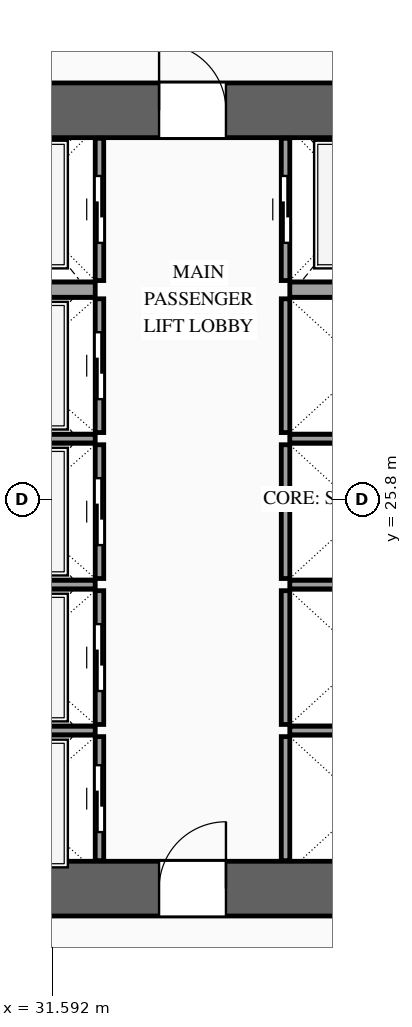
"""IFC4 building model, lengths in metres.
Left out: names, types, materials, properties, quantities, classifications, styles, units other than length and angle.
Written with IfcOpenShell. Run it as: python <this file> out.ifc"""

import sys

from ifc_helpers import new_model, si_unit, direction, frame, frame_2d, origin, place, context, subcontext, project, spatial, rectangle, extrude, source, transform, mapped, element, fill, save


model = new_model("IFC4")
c1 = context("Model", 3, precision=1e-05, world=origin(), true_north=direction((0.0, 1.0)))
c2 = subcontext(c1, "Body", "Model", "MODEL_VIEW")
j1 = project(units=[si_unit("LENGTHUNIT", "METRE"), si_unit("PLANEANGLEUNIT", "RADIAN")], contexts=[c1])
p1 = place(None, origin())
s1 = spatial("IfcSite", under=j1, at=p1, CompositionType="ELEMENT")
p2 = place(p1, origin())
s2 = spatial("IfcBuilding", under=s1, at=p2, CompositionType="ELEMENT")
p3 = place(p2, frame((0.0, 0.0, 15.0)))
s3 = spatial("IfcBuildingStorey", under=s2, at=p3, CompositionType="ELEMENT", Elevation=15.0)
p4 = place(p3, frame((23.35, 19.4, 0.0), z_axis=(0.0, 0.0, 1.0), x_axis=(1.0, 0.0, 0.0)))
e1 = element("IfcWall", 1, at=p4, inside=s3, PredefinedType="SHEAR", context=c2, shape_type="SweptSolid", body=[
    extrude(rectangle(XDim=27.3, YDim=0.9, at=frame_2d((13.65, 0.0))), origin(), (0.0, 0.0, 1.0), 4.8),
])
p5 = place(p4, frame((2.1, 0.0, 0.0)))
e2 = element("IfcOpeningElement", 2, at=p5, cuts=e1, PredefinedType="OPENING", context=c2, shape_type="SweptSolid", body=[
    extrude(rectangle(XDim=1.1, YDim=2.2, at=frame_2d((0.55, 1.1))), frame((0.0, 0.465, 0.0), z_axis=(0.0, -1.0, 0.0), x_axis=(1.0, 0.0, 0.0)), (0.0, 0.0, 1.0), 0.93),
])
p6 = place(p4, frame((10.0, 0.0, 0.0)))
e3 = element("IfcOpeningElement", 3, at=p6, cuts=e1, PredefinedType="OPENING", context=c2, shape_type="SweptSolid", body=[
    extrude(rectangle(XDim=1.1, YDim=2.2, at=frame_2d((0.55, 1.1))), frame((0.0, 0.465, 0.0), z_axis=(0.0, -1.0, 0.0), x_axis=(1.0, 0.0, 0.0)), (0.0, 0.0, 1.0), 0.93),
])
p7 = place(p4, frame((23.2, 0.0, 0.0)))
e4 = element("IfcOpeningElement", 4, at=p7, cuts=e1, PredefinedType="OPENING", context=c2, shape_type="SweptSolid", body=[
    extrude(rectangle(XDim=1.1, YDim=2.2, at=frame_2d((0.55, 1.1))), frame((0.0, 0.465, 0.0), z_axis=(0.0, -1.0, 0.0), x_axis=(1.0, 0.0, 0.0)), (0.0, 0.0, 1.0), 0.93),
])
p8 = place(p4, frame((19.82, 0.0, 0.0)))
e5 = element("IfcOpeningElement", 5, at=p8, cuts=e1, PredefinedType="OPENING", context=c2, shape_type="SweptSolid", body=[
    extrude(rectangle(XDim=0.9, YDim=2.15, at=frame_2d((0.45, 1.075))), frame((0.0, 0.465, 0.0), z_axis=(0.0, -1.0, 0.0), x_axis=(1.0, 0.0, 0.0)), (0.0, 0.0, 1.0), 0.93),
])
p9 = place(p4, frame((18.38, 0.0, 0.0)))
e6 = element("IfcOpeningElement", 6, at=p9, cuts=e1, PredefinedType="OPENING", context=c2, shape_type="SweptSolid", body=[
    extrude(rectangle(XDim=0.9, YDim=2.15, at=frame_2d((0.45, 1.075))), frame((0.0, 0.465, 0.0), z_axis=(0.0, -1.0, 0.0), x_axis=(1.0, 0.0, 0.0)), (0.0, 0.0, 1.0), 0.93),
])
p10 = place(p3, frame((23.35, 32.2, 0.0), z_axis=(0.0, 0.0, 1.0), x_axis=(1.0, 0.0, 0.0)))
e7 = element("IfcWall", 7, at=p10, inside=s3, PredefinedType="SHEAR", context=c2, shape_type="SweptSolid", body=[
    extrude(rectangle(XDim=27.3, YDim=0.9, at=frame_2d((13.65, 0.0))), origin(), (0.0, 0.0, 1.0), 4.8),
])
p11 = place(p10, frame((4.72, 0.0, 0.0)))
e8 = element("IfcOpeningElement", 8, at=p11, cuts=e7, PredefinedType="OPENING", context=c2, shape_type="SweptSolid", body=[
    extrude(rectangle(XDim=0.9, YDim=2.15, at=frame_2d((0.45, 1.075))), frame((0.0, 0.465, 0.0), z_axis=(0.0, -1.0, 0.0), x_axis=(1.0, 0.0, 0.0)), (0.0, 0.0, 1.0), 0.93),
])
p12 = place(p10, frame((10.0, 0.0, 0.0)))
e9 = element("IfcOpeningElement", 9, at=p12, cuts=e7, PredefinedType="OPENING", context=c2, shape_type="SweptSolid", body=[
    extrude(rectangle(XDim=1.1, YDim=2.2, at=frame_2d((0.55, 1.1))), frame((0.0, 0.465, 0.0), z_axis=(0.0, -1.0, 0.0), x_axis=(1.0, 0.0, 0.0)), (0.0, 0.0, 1.0), 0.93),
])
p13 = place(p10, frame((15.85, 0.0, 0.0)))
e10 = element("IfcOpeningElement", 10, at=p13, cuts=e7, PredefinedType="OPENING", context=c2, shape_type="SweptSolid", body=[
    extrude(rectangle(XDim=1.1, YDim=2.2, at=frame_2d((0.55, 1.1))), frame((0.0, 0.465, 0.0), z_axis=(0.0, -1.0, 0.0), x_axis=(1.0, 0.0, 0.0)), (0.0, 0.0, 1.0), 0.93),
])
p14 = place(p10, frame((19.05, 0.0, 0.0)))
e11 = element("IfcOpeningElement", 11, at=p14, cuts=e7, PredefinedType="OPENING", context=c2, shape_type="SweptSolid", body=[
    extrude(rectangle(XDim=0.9, YDim=2.15, at=frame_2d((0.45, 1.075))), frame((0.0, 0.465, 0.0), z_axis=(0.0, -1.0, 0.0), x_axis=(1.0, 0.0, 0.0)), (0.0, 0.0, 1.0), 0.93),
])
p15 = place(p3, frame((32.37, 19.86, 0.0), z_axis=(0.0, 0.0, 1.0), x_axis=(0.0, 1.0, 0.0)))
e12 = element("IfcWall", 12, at=p15, inside=s3, PredefinedType="SOLIDWALL", context=c2, shape_type="SweptSolid", body=[
    extrude(rectangle(XDim=2.04, YDim=0.14, at=frame_2d((1.02, 0.0))), origin(), (0.0, 0.0, 1.0), 4.52),
])
p16 = place(p15, frame((0.47, 0.0, 0.0)))
e13 = element("IfcOpeningElement", 13, at=p16, cuts=e12, PredefinedType="OPENING", context=c2, shape_type="SweptSolid", body=[
    extrude(rectangle(XDim=1.1, YDim=2.2, at=frame_2d((0.55, 1.1))), frame((0.0, 0.085, 0.0), z_axis=(0.0, -1.0, 0.0), x_axis=(1.0, 0.0, 0.0)), (0.0, 0.0, 1.0), 0.17),
])
m1 = source(origin(), c2, "Body", "SweptSolid", [
    extrude(rectangle(XDim=2.5, YDim=0.14, at=frame_2d((1.25, 0.0))), origin(), (0.0, 0.0, 1.0), 4.52),
])
p17 = place(p3, frame((29.8, 22.0, 0.0), z_axis=(0.0, 0.0, 1.0), x_axis=(1.0, 0.0, 0.0)))
e14 = element("IfcWall", 14, at=p17, inside=s3, PredefinedType="SOLIDWALL", context=c2, shape_type="MappedRepresentation", body=[
    mapped(m1, transform((0.0, 0.0, 0.0), scale=1.0)),
])
p18 = place(p3, frame((32.37, 22.1, 0.0), z_axis=(0.0, 0.0, 1.0), x_axis=(0.0, 1.0, 0.0)))
e15 = element("IfcWall", 15, at=p18, inside=s3, PredefinedType="SOLIDWALL", context=c2, shape_type="SweptSolid", body=[
    extrude(rectangle(XDim=2.2, YDim=0.14, at=frame_2d((1.1, 0.0))), origin(), (0.0, 0.0, 1.0), 4.52),
])
p19 = place(p18, frame((0.55, 0.0, 0.0)))
e16 = element("IfcOpeningElement", 16, at=p19, cuts=e15, PredefinedType="OPENING", context=c2, shape_type="SweptSolid", body=[
    extrude(rectangle(XDim=1.1, YDim=2.2, at=frame_2d((0.55, 1.1))), frame((0.0, 0.085, 0.0), z_axis=(0.0, -1.0, 0.0), x_axis=(1.0, 0.0, 0.0)), (0.0, 0.0, 1.0), 0.17),
])
p20 = place(p3, frame((29.8, 24.4, 0.0), z_axis=(0.0, 0.0, 1.0), x_axis=(1.0, 0.0, 0.0)))
e17 = element("IfcWall", 17, at=p20, inside=s3, PredefinedType="SOLIDWALL", context=c2, shape_type="MappedRepresentation", body=[
    mapped(m1, transform((0.0, 0.0, 0.0), scale=1.0)),
])
p21 = place(p3, frame((32.37, 24.5, 0.0), z_axis=(0.0, 0.0, 1.0), x_axis=(0.0, 1.0, 0.0)))
e18 = element("IfcWall", 18, at=p21, inside=s3, PredefinedType="SOLIDWALL", context=c2, shape_type="SweptSolid", body=[
    extrude(rectangle(XDim=2.2, YDim=0.14, at=frame_2d((1.1, 0.0))), origin(), (0.0, 0.0, 1.0), 4.52),
])
p22 = place(p21, frame((0.55, 0.0, 0.0)))
e19 = element("IfcOpeningElement", 19, at=p22, cuts=e18, PredefinedType="OPENING", context=c2, shape_type="SweptSolid", body=[
    extrude(rectangle(XDim=1.1, YDim=2.2, at=frame_2d((0.55, 1.1))), frame((0.0, 0.085, 0.0), z_axis=(0.0, -1.0, 0.0), x_axis=(1.0, 0.0, 0.0)), (0.0, 0.0, 1.0), 0.17),
])
p23 = place(p3, frame((29.8, 26.8, 0.0), z_axis=(0.0, 0.0, 1.0), x_axis=(1.0, 0.0, 0.0)))
e20 = element("IfcWall", 20, at=p23, inside=s3, PredefinedType="SOLIDWALL", context=c2, shape_type="MappedRepresentation", body=[
    mapped(m1, transform((0.0, 0.0, 0.0), scale=1.0)),
])
p24 = place(p3, frame((32.37, 26.9, 0.0), z_axis=(0.0, 0.0, 1.0), x_axis=(0.0, 1.0, 0.0)))
e21 = element("IfcWall", 21, at=p24, inside=s3, PredefinedType="SOLIDWALL", context=c2, shape_type="SweptSolid", body=[
    extrude(rectangle(XDim=2.2, YDim=0.14, at=frame_2d((1.1, 0.0))), origin(), (0.0, 0.0, 1.0), 4.52),
])
p25 = place(p24, frame((0.55, 0.0, 0.0)))
e22 = element("IfcOpeningElement", 22, at=p25, cuts=e21, PredefinedType="OPENING", context=c2, shape_type="SweptSolid", body=[
    extrude(rectangle(XDim=1.1, YDim=2.2, at=frame_2d((0.55, 1.1))), frame((0.0, 0.085, 0.0), z_axis=(0.0, -1.0, 0.0), x_axis=(1.0, 0.0, 0.0)), (0.0, 0.0, 1.0), 0.17),
])
p26 = place(p3, frame((32.37, 29.4, 0.0), z_axis=(0.0, 0.0, 1.0), x_axis=(0.0, 1.0, 0.0)))
e23 = element("IfcWall", 23, at=p26, inside=s3, PredefinedType="SOLIDWALL", context=c2, shape_type="SweptSolid", body=[
    extrude(rectangle(XDim=2.34, YDim=0.14, at=frame_2d((1.17, 0.0))), origin(), (0.0, 0.0, 1.0), 4.52),
])
p27 = place(p26, frame((0.62, 0.0, 0.0)))
e24 = element("IfcOpeningElement", 24, at=p27, cuts=e23, PredefinedType="OPENING", context=c2, shape_type="SweptSolid", body=[
    extrude(rectangle(XDim=1.1, YDim=2.2, at=frame_2d((0.55, 1.1))), frame((0.0, 0.085, 0.0), z_axis=(0.0, -1.0, 0.0), x_axis=(1.0, 0.0, 0.0)), (0.0, 0.0, 1.0), 0.17),
])
m2 = source(origin(), c2, "Body", "SweptSolid", [
    extrude(rectangle(XDim=2.5, YDim=0.25, at=frame_2d((1.25, 0.0))), origin(), (0.0, 0.0, 1.0), 4.52),
])
p28 = place(p3, frame((29.8, 29.25, 0.0), z_axis=(0.0, 0.0, 1.0), x_axis=(1.0, 0.0, 0.0)))
e25 = element("IfcWall", 25, at=p28, inside=s3, PredefinedType="SOLIDWALL", context=c2, shape_type="MappedRepresentation", body=[
    mapped(m2, transform((0.0, 0.0, 0.0), scale=1.0)),
])
m3 = source(origin(), c2, "Body", "SweptSolid", [
    extrude(rectangle(XDim=2.04, YDim=0.14, at=frame_2d((1.02, 0.0))), origin(), (0.0, 0.0, 1.0), 4.52),
])
p29 = place(p3, frame((35.43, 19.86, 0.0), z_axis=(0.0, 0.0, 1.0), x_axis=(0.0, 1.0, 0.0)))
e26 = element("IfcWall", 26, at=p29, inside=s3, PredefinedType="SOLIDWALL", context=c2, shape_type="MappedRepresentation", body=[
    mapped(m3, transform((0.0, 0.0, 0.0), scale=1.0)),
])
m4 = source(origin(), c2, "Body", "SweptSolid", [
    extrude(rectangle(XDim=2.4, YDim=0.14, at=frame_2d((1.2, 0.0))), origin(), (0.0, 0.0, 1.0), 4.52),
])
p30 = place(p3, frame((35.5, 22.0, 0.0), z_axis=(0.0, 0.0, 1.0), x_axis=(1.0, 0.0, 0.0)))
e27 = element("IfcWall", 27, at=p30, inside=s3, PredefinedType="SOLIDWALL", context=c2, shape_type="MappedRepresentation", body=[
    mapped(m4, transform((0.0, 0.0, 0.0), scale=1.0)),
])
m5 = source(origin(), c2, "Body", "SweptSolid", [
    extrude(rectangle(XDim=2.2, YDim=0.14, at=frame_2d((1.1, 0.0))), origin(), (0.0, 0.0, 1.0), 4.52),
])
p31 = place(p3, frame((35.43, 22.1, 0.0), z_axis=(0.0, 0.0, 1.0), x_axis=(0.0, 1.0, 0.0)))
e28 = element("IfcWall", 28, at=p31, inside=s3, PredefinedType="SOLIDWALL", context=c2, shape_type="MappedRepresentation", body=[
    mapped(m5, transform((0.0, 0.0, 0.0), scale=1.0)),
])
p32 = place(p3, frame((35.5, 24.4, 0.0), z_axis=(0.0, 0.0, 1.0), x_axis=(1.0, 0.0, 0.0)))
e29 = element("IfcWall", 29, at=p32, inside=s3, PredefinedType="SOLIDWALL", context=c2, shape_type="MappedRepresentation", body=[
    mapped(m4, transform((0.0, 0.0, 0.0), scale=1.0)),
])
p33 = place(p3, frame((35.43, 24.5, 0.0), z_axis=(0.0, 0.0, 1.0), x_axis=(0.0, 1.0, 0.0)))
e30 = element("IfcWall", 30, at=p33, inside=s3, PredefinedType="SOLIDWALL", context=c2, shape_type="MappedRepresentation", body=[
    mapped(m5, transform((0.0, 0.0, 0.0), scale=1.0)),
])
p34 = place(p3, frame((35.5, 26.8, 0.0), z_axis=(0.0, 0.0, 1.0), x_axis=(1.0, 0.0, 0.0)))
e31 = element("IfcWall", 31, at=p34, inside=s3, PredefinedType="SOLIDWALL", context=c2, shape_type="MappedRepresentation", body=[
    mapped(m4, transform((0.0, 0.0, 0.0), scale=1.0)),
])
m6 = source(origin(), c2, "Body", "SweptSolid", [
    extrude(rectangle(XDim=2.2, YDim=0.14, at=frame_2d((1.1, 0.0))), origin(), (0.0, 0.0, 1.0), 4.52),
])
p35 = place(p3, frame((35.43, 26.9, 0.0), z_axis=(0.0, 0.0, 1.0), x_axis=(0.0, 1.0, 0.0)))
e32 = element("IfcWall", 32, at=p35, inside=s3, PredefinedType="SOLIDWALL", context=c2, shape_type="MappedRepresentation", body=[
    mapped(m6, transform((0.0, 0.0, 0.0), scale=1.0)),
])
p36 = place(p3, frame((35.43, 29.4, 0.0), z_axis=(0.0, 0.0, 1.0), x_axis=(0.0, 1.0, 0.0)))
e33 = element("IfcWall", 33, at=p36, inside=s3, PredefinedType="SOLIDWALL", context=c2, shape_type="SweptSolid", body=[
    extrude(rectangle(XDim=2.34, YDim=0.14, at=frame_2d((1.17, 0.0))), origin(), (0.0, 0.0, 1.0), 4.52),
])
p37 = place(p36, frame((0.62, 0.0, 0.0)))
e34 = element("IfcOpeningElement", 34, at=p37, cuts=e33, PredefinedType="OPENING", context=c2, shape_type="SweptSolid", body=[
    extrude(rectangle(XDim=1.1, YDim=2.2, at=frame_2d((0.55, 1.1))), frame((0.0, 0.085, 0.0), z_axis=(0.0, -1.0, 0.0), x_axis=(1.0, 0.0, 0.0)), (0.0, 0.0, 1.0), 0.17),
])
m7 = source(origin(), c2, "Body", "SweptSolid", [
    extrude(rectangle(XDim=2.4, YDim=0.25, at=frame_2d((1.2, 0.0))), origin(), (0.0, 0.0, 1.0), 4.52),
])
p38 = place(p3, frame((35.5, 29.25, 0.0), z_axis=(0.0, 0.0, 1.0), x_axis=(1.0, 0.0, 0.0)))
e35 = element("IfcWall", 35, at=p38, inside=s3, PredefinedType="SOLIDWALL", context=c2, shape_type="MappedRepresentation", body=[
    mapped(m7, transform((0.0, 0.0, 0.0), scale=1.0)),
])
m8 = source(origin(), c2, "Body", "SweptSolid", [
    extrude(rectangle(XDim=1.1, YDim=2.2, at=frame_2d((0.55, 1.1))), frame((0.0, 0.025, 0.0), z_axis=(0.0, -1.0, 0.0), x_axis=(1.0, 0.0, 0.0)), (0.0, 0.0, 1.0), 0.05),
])
p39 = place(p16, origin())
e36 = element("IfcDoor", 36, at=p39, inside=s3, OperationType="SLIDING_TO_LEFT", PredefinedType="DOOR", context=c2, shape_type="MappedRepresentation", body=[
    mapped(m8, transform((0.0, 0.0, 0.0), scale=1.0)),
])
fill(e13, e36)
p40 = place(p19, origin())
e37 = element("IfcDoor", 37, at=p40, inside=s3, OperationType="SLIDING_TO_RIGHT", PredefinedType="DOOR", context=c2, shape_type="MappedRepresentation", body=[
    mapped(m8, transform((0.0, 0.0, 0.0), scale=1.0)),
])
fill(e16, e37)
p41 = place(p22, origin())
e38 = element("IfcDoor", 38, at=p41, inside=s3, OperationType="SLIDING_TO_LEFT", PredefinedType="DOOR", context=c2, shape_type="MappedRepresentation", body=[
    mapped(m8, transform((0.0, 0.0, 0.0), scale=1.0)),
])
fill(e19, e38)
p42 = place(p25, origin())
e39 = element("IfcDoor", 39, at=p42, inside=s3, OperationType="SLIDING_TO_RIGHT", PredefinedType="DOOR", context=c2, shape_type="MappedRepresentation", body=[
    mapped(m8, transform((0.0, 0.0, 0.0), scale=1.0)),
])
fill(e22, e39)
p43 = place(p27, origin())
e40 = element("IfcDoor", 40, at=p43, inside=s3, OperationType="SLIDING_TO_LEFT", PredefinedType="DOOR", context=c2, shape_type="MappedRepresentation", body=[
    mapped(m8, transform((0.0, 0.0, 0.0), scale=1.0)),
])
fill(e24, e40)
p44 = place(p37, origin())
e41 = element("IfcDoor", 41, at=p44, inside=s3, OperationType="SLIDING_TO_RIGHT", PredefinedType="DOOR", context=c2, shape_type="MappedRepresentation", body=[
    mapped(m8, transform((0.0, 0.0, 0.0), scale=1.0)),
])
fill(e34, e41)
m9 = source(origin(), c2, "Body", "SweptSolid", [
    extrude(rectangle(XDim=1.1, YDim=2.2, at=frame_2d((0.55, 1.1))), frame((0.0, 0.025, 0.0), z_axis=(0.0, -1.0, 0.0), x_axis=(1.0, 0.0, 0.0)), (0.0, 0.0, 1.0), 0.05),
])
p45 = place(p6, origin())
e42 = element("IfcDoor", 42, at=p45, inside=s3, OperationType="SINGLE_SWING_RIGHT", PredefinedType="DOOR", context=c2, shape_type="MappedRepresentation", body=[
    mapped(m9, transform((0.0, 0.0, 0.0), scale=1.0)),
])
fill(e3, e42)
p46 = place(p12, origin())
e43 = element("IfcDoor", 43, at=p46, inside=s3, OperationType="SINGLE_SWING_LEFT", PredefinedType="DOOR", context=c2, shape_type="MappedRepresentation", body=[
    mapped(m9, transform((0.0, 0.0, 0.0), scale=1.0)),
])
fill(e9, e43)
save(model, sys.argv[1])
